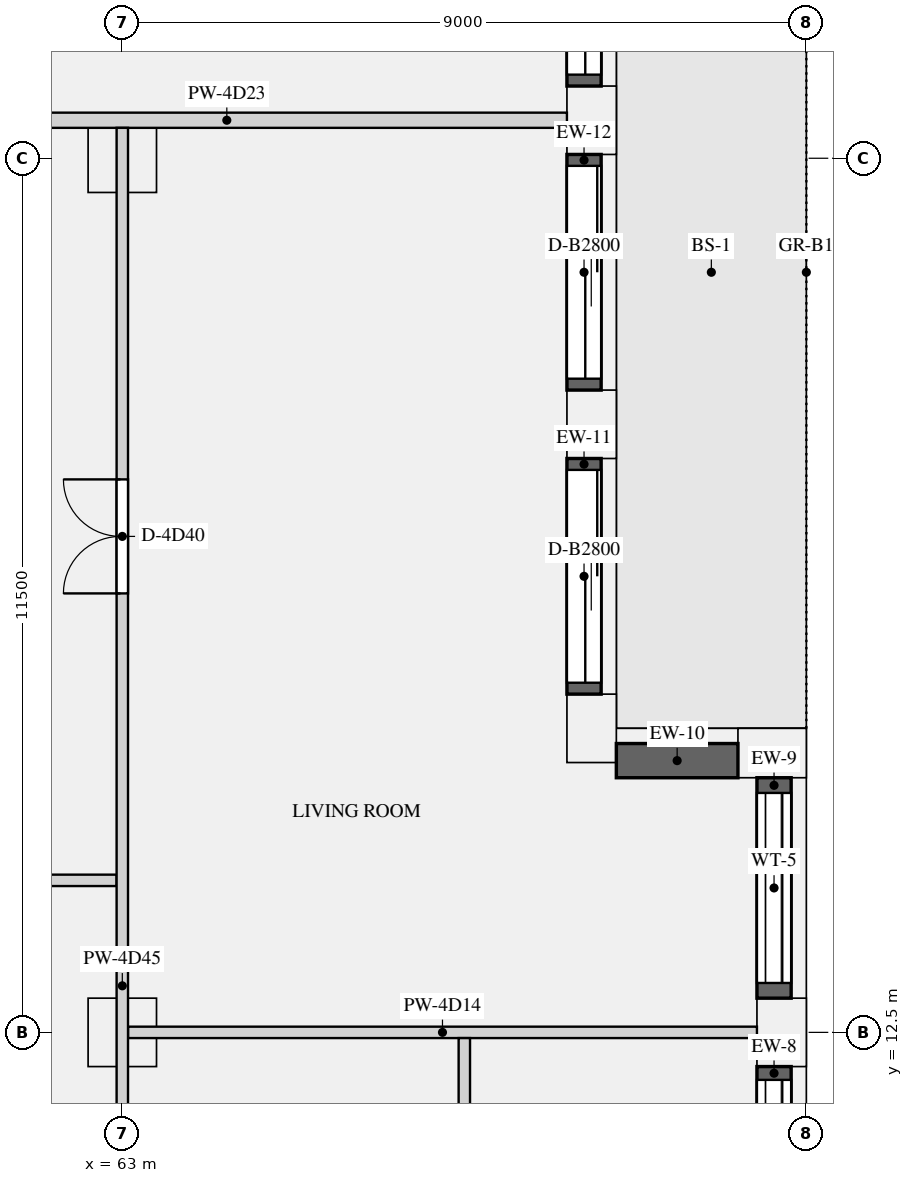
"""IFC4 building model, lengths in metres.
Left out: names, types, materials, properties, quantities, classifications, styles, units other than length and angle.
Written with IfcOpenShell. Run it as: python <this file> out.ifc"""

import sys

from ifc_helpers import new_model, si_unit, direction, frame, frame_2d, origin, origin_2d, place, context, subcontext, project, spatial, rectangle, extrude, element, fill, save


model = new_model("IFC4")
c1 = context("Model", 3, precision=1e-05, world=origin(), true_north=direction((0.0, 1.0)))
c2 = subcontext(c1, "Body", "Model", "MODEL_VIEW")
j1 = project(units=[si_unit("LENGTHUNIT", "METRE"), si_unit("PLANEANGLEUNIT", "RADIAN")], contexts=[c1])
p1 = place(None, origin())
s1 = spatial("IfcSite", under=j1, at=p1, CompositionType="ELEMENT")
p2 = place(p1, origin())
s2 = spatial("IfcBuilding", under=s1, at=p2, CompositionType="ELEMENT")
p3 = place(p2, frame((0.0, 0.0, 223.2)))
s3 = spatial("IfcBuildingStorey", under=s2, at=p3, CompositionType="ELEMENT", Elevation=223.2)
for number, where, z_axis, x_axis in (
    (1, (71.675, 12.5, 0.0), (0.0, 0.0, 1.0), (0.0, 1.0, 0.0)),
    (2, (71.55, 16.175, 0.0), (0.0, 0.0, 1.0), (-1.0, 0.0, 0.0)),
    (3, (69.175, 16.5, 0.0), (0.0, 0.0, 1.0), (0.0, 1.0, 0.0)),
    (4, (69.175, 20.5, 0.0), (0.0, 0.0, 1.0), (0.0, 1.0, 0.0)),
    (5, (69.175, 24.5, 0.0), (0.0, 0.0, 1.0), (0.0, 1.0, 0.0)),
):
    element("IfcColumn", number, at=place(p3, frame(where, z_axis=z_axis, x_axis=x_axis)), inside=s3, PredefinedType="USERDEFINED", context=c2, shape_type="SweptSolid", body=[
        extrude(rectangle(XDim=0.9, YDim=0.65, at=origin_2d()), origin(), (0.0, 0.0, 1.0), 3.15),
    ])
for number, where, z_axis, x_axis in (
    (6, (63.0, 24.0, 0.0), (0.0, 0.0, 1.0), (1.0, 0.0, 0.0)),
    (7, (63.0, 12.5, 0.0), (0.0, 0.0, 1.0), (1.0, 0.0, 0.0)),
):
    element("IfcColumn", number, at=place(p3, frame(where, z_axis=z_axis, x_axis=x_axis)), inside=s3, PredefinedType="COLUMN", context=c2, shape_type="SweptSolid", body=[
        extrude(rectangle(XDim=0.9, YDim=0.9, at=origin_2d()), origin(), (0.0, 0.0, 1.0), 3.15),
    ])
p4 = place(p3, frame((71.575, 8.95, 0.9), z_axis=(0.0, 0.0, 1.0), x_axis=(0.0, 1.0, 0.0)))
e8 = element("IfcWall", 8, at=p4, inside=s3, PredefinedType="SOLIDWALL", context=c2, shape_type="SweptSolid", body=[
    extrude(rectangle(XDim=3.1, YDim=0.45, at=frame_2d((1.55, 0.0))), origin(), (0.0, 0.0, 1.0), 1.93),
])
p5 = place(p4, frame((0.175, 0.0, 0.15)))
e9 = element("IfcOpeningElement", 9, at=p5, cuts=e8, PredefinedType="OPENING", context=c2, shape_type="SweptSolid", body=[
    extrude(rectangle(XDim=2.75, YDim=1.5, at=frame_2d((1.375, 0.75))), frame((0.0, 0.235, 0.0), z_axis=(0.0, -1.0, 0.0), x_axis=(1.0, 0.0, 0.0)), (0.0, 0.0, 1.0), 0.47),
])
p6 = place(p3, frame((71.575, 12.95, 0.9), z_axis=(0.0, 0.0, 1.0), x_axis=(0.0, 1.0, 0.0)))
e10 = element("IfcWall", 10, at=p6, inside=s3, PredefinedType="SOLIDWALL", context=c2, shape_type="SweptSolid", body=[
    extrude(rectangle(XDim=2.9, YDim=0.45, at=frame_2d((1.45, 0.0))), origin(), (0.0, 0.0, 1.0), 1.93),
])
p7 = place(p6, frame((0.2, 0.0, 0.15)))
e11 = element("IfcOpeningElement", 11, at=p7, cuts=e10, PredefinedType="OPENING", context=c2, shape_type="SweptSolid", body=[
    extrude(rectangle(XDim=2.5, YDim=1.5, at=frame_2d((1.25, 0.75))), frame((0.0, 0.235, 0.0), z_axis=(0.0, -1.0, 0.0), x_axis=(1.0, 0.0, 0.0)), (0.0, 0.0, 1.0), 0.47),
])
p8 = place(p3, frame((71.1, 16.075, 0.9), z_axis=(0.0, 0.0, 1.0), x_axis=(-1.0, 0.0, 0.0)))
e12 = element("IfcWall", 12, at=p8, inside=s3, PredefinedType="SOLIDWALL", context=c2, shape_type="SweptSolid", body=[
    extrude(rectangle(XDim=1.6, YDim=0.45, at=frame_2d((0.8, 0.0))), origin(), (0.0, 0.0, 1.0), 1.93),
])
p9 = place(p3, frame((69.075, 16.95, 0.0), z_axis=(0.0, 0.0, 1.0), x_axis=(0.0, 1.0, 0.0)))
e13 = element("IfcWall", 13, at=p9, inside=s3, PredefinedType="SOLIDWALL", context=c2, shape_type="SweptSolid", body=[
    extrude(rectangle(XDim=3.1, YDim=0.45, at=frame_2d((1.55, 0.0))), origin(), (0.0, 0.0, 1.0), 2.83),
])
p10 = place(p9, frame((0.15, 0.0, 0.0)))
e14 = element("IfcOpeningElement", 14, at=p10, cuts=e13, PredefinedType="OPENING", context=c2, shape_type="SweptSolid", body=[
    extrude(rectangle(XDim=2.8, YDim=2.3, at=frame_2d((1.4, 1.15))), frame((0.0, 0.235, 0.0), z_axis=(0.0, -1.0, 0.0), x_axis=(1.0, 0.0, 0.0)), (0.0, 0.0, 1.0), 0.47),
])
p11 = place(p3, frame((69.075, 20.95, 0.0), z_axis=(0.0, 0.0, 1.0), x_axis=(0.0, 1.0, 0.0)))
e15 = element("IfcWall", 15, at=p11, inside=s3, PredefinedType="SOLIDWALL", context=c2, shape_type="SweptSolid", body=[
    extrude(rectangle(XDim=3.1, YDim=0.45, at=frame_2d((1.55, 0.0))), origin(), (0.0, 0.0, 1.0), 2.83),
])
p12 = place(p11, frame((0.15, 0.0, 0.0)))
e16 = element("IfcOpeningElement", 16, at=p12, cuts=e15, PredefinedType="OPENING", context=c2, shape_type="SweptSolid", body=[
    extrude(rectangle(XDim=2.8, YDim=2.3, at=frame_2d((1.4, 1.15))), frame((0.0, 0.235, 0.0), z_axis=(0.0, -1.0, 0.0), x_axis=(1.0, 0.0, 0.0)), (0.0, 0.0, 1.0), 0.47),
])
p13 = place(p3, frame((69.075, 24.95, 0.0), z_axis=(0.0, 0.0, 1.0), x_axis=(0.0, 1.0, 0.0)))
e17 = element("IfcWall", 17, at=p13, inside=s3, PredefinedType="SOLIDWALL", context=c2, shape_type="SweptSolid", body=[
    extrude(rectangle(XDim=3.55, YDim=0.45, at=frame_2d((1.775, 0.0))), origin(), (0.0, 0.0, 1.0), 2.83),
])
p14 = place(p13, frame((0.15, 0.0, 0.0)))
e18 = element("IfcOpeningElement", 18, at=p14, cuts=e17, PredefinedType="OPENING", context=c2, shape_type="SweptSolid", body=[
    extrude(rectangle(XDim=3.25, YDim=2.3, at=frame_2d((1.625, 1.15))), frame((0.0, 0.235, 0.0), z_axis=(0.0, -1.0, 0.0), x_axis=(1.0, 0.0, 0.0)), (0.0, 0.0, 1.0), 0.47),
])
p15 = place(p3, frame((63.075, 12.5, 0.0), z_axis=(0.0, 0.0, 1.0), x_axis=(1.0, 0.0, 0.0)))
e19 = element("IfcWall", 19, at=p15, inside=s3, PredefinedType="PARTITIONING", context=c2, shape_type="SweptSolid", body=[
    extrude(rectangle(XDim=8.275, YDim=0.15, at=frame_2d((4.138, 0.0))), origin(), (0.0, 0.0, 1.0), 2.83),
])
p16 = place(p3, frame((59.9, 24.5, 0.0), z_axis=(0.0, 0.0, 1.0), x_axis=(1.0, 0.0, 0.0)))
e20 = element("IfcWall", 20, at=p16, inside=s3, PredefinedType="PARTITIONING", context=c2, shape_type="SweptSolid", body=[
    extrude(rectangle(XDim=8.95, YDim=0.2, at=frame_2d((4.475, 0.0))), origin(), (0.0, 0.0, 1.0), 2.83),
])
p17 = place(p3, frame((58.575, 14.5, 0.0), z_axis=(0.0, 0.0, 1.0), x_axis=(1.0, 0.0, 0.0)))
e21 = element("IfcWall", 21, at=p17, inside=s3, PredefinedType="PARTITIONING", context=c2, shape_type="SweptSolid", body=[
    extrude(rectangle(XDim=4.35, YDim=0.15, at=frame_2d((2.175, 0.0))), origin(), (0.0, 0.0, 1.0), 2.83),
])
p18 = place(p3, frame((63.0, 0.65, 0.0), z_axis=(0.0, 0.0, 1.0), x_axis=(0.0, 1.0, 0.0)))
e22 = element("IfcWall", 22, at=p18, inside=s3, PredefinedType="PARTITIONING", context=c2, shape_type="SweptSolid", body=[
    extrude(rectangle(XDim=23.75, YDim=0.15, at=frame_2d((11.875, 0.0))), origin(), (0.0, 0.0, 1.0), 2.83),
])
p19 = place(p18, frame((6.4, 0.0, 0.0)))
e23 = element("IfcOpeningElement", 23, at=p19, cuts=e22, PredefinedType="OPENING", context=c2, shape_type="SweptSolid", body=[
    extrude(rectangle(XDim=0.9, YDim=2.1, at=frame_2d((0.45, 1.05))), frame((0.0, 0.085, 0.0), z_axis=(0.0, -1.0, 0.0), x_axis=(1.0, 0.0, 0.0)), (0.0, 0.0, 1.0), 0.17),
])
p20 = place(p18, frame((17.625, 0.0, 0.0)))
e24 = element("IfcOpeningElement", 24, at=p20, cuts=e22, PredefinedType="OPENING", context=c2, shape_type="SweptSolid", body=[
    extrude(rectangle(XDim=1.5, YDim=2.1, at=frame_2d((0.75, 1.05))), frame((0.0, 0.085, 0.0), z_axis=(0.0, -1.0, 0.0), x_axis=(1.0, 0.0, 0.0)), (0.0, 0.0, 1.0), 0.17),
])
p21 = place(p3, frame((67.5, 8.575, 0.0), z_axis=(0.0, 0.0, 1.0), x_axis=(0.0, 1.0, 0.0)))
e25 = element("IfcWall", 25, at=p21, inside=s3, PredefinedType="PARTITIONING", context=c2, shape_type="SweptSolid", body=[
    extrude(rectangle(XDim=3.85, YDim=0.15, at=frame_2d((1.925, 0.0))), origin(), (0.0, 0.0, 1.0), 2.83),
])
p22 = place(p5, origin())
e26 = element("IfcWindow", 26, at=p22, inside=s3, PartitioningType="SINGLE_PANEL", PredefinedType="WINDOW", context=c2, shape_type="SweptSolid", body=[
    extrude(rectangle(XDim=2.75, YDim=1.5, at=frame_2d((1.375, 0.75))), frame((0.0, -0.065, 0.0), z_axis=(0.0, -1.0, 0.0), x_axis=(1.0, 0.0, 0.0)), (0.0, 0.0, 1.0), 0.06),
])
fill(e9, e26)
p23 = place(p7, origin())
e27 = element("IfcWindow", 27, at=p23, inside=s3, PartitioningType="SINGLE_PANEL", PredefinedType="WINDOW", context=c2, shape_type="SweptSolid", body=[
    extrude(rectangle(XDim=2.5, YDim=1.5, at=frame_2d((1.25, 0.75))), frame((0.0, -0.065, 0.0), z_axis=(0.0, -1.0, 0.0), x_axis=(1.0, 0.0, 0.0)), (0.0, 0.0, 1.0), 0.06),
])
fill(e11, e27)
p24 = place(p10, origin())
e28 = element("IfcDoor", 28, at=p24, inside=s3, OperationType="SLIDING_TO_LEFT", PredefinedType="DOOR", context=c2, shape_type="SweptSolid", body=[
    extrude(rectangle(XDim=2.8, YDim=2.3, at=frame_2d((1.4, 1.15))), frame((0.0, -0.07, 0.0), z_axis=(0.0, -1.0, 0.0), x_axis=(1.0, 0.0, 0.0)), (0.0, 0.0, 1.0), 0.05),
])
fill(e14, e28)
p25 = place(p12, origin())
e29 = element("IfcDoor", 29, at=p25, inside=s3, OperationType="SLIDING_TO_LEFT", PredefinedType="DOOR", context=c2, shape_type="SweptSolid", body=[
    extrude(rectangle(XDim=2.8, YDim=2.3, at=frame_2d((1.4, 1.15))), frame((0.0, -0.07, 0.0), z_axis=(0.0, -1.0, 0.0), x_axis=(1.0, 0.0, 0.0)), (0.0, 0.0, 1.0), 0.05),
])
fill(e16, e29)
p26 = place(p14, origin())
e30 = element("IfcDoor", 30, at=p26, inside=s3, OperationType="SLIDING_TO_LEFT", PredefinedType="DOOR", context=c2, shape_type="SweptSolid", body=[
    extrude(rectangle(XDim=3.25, YDim=2.3, at=frame_2d((1.625, 1.15))), frame((0.0, -0.07, 0.0), z_axis=(0.0, -1.0, 0.0), x_axis=(1.0, 0.0, 0.0)), (0.0, 0.0, 1.0), 0.05),
])
fill(e18, e30)
p27 = place(p20, origin())
e31 = element("IfcDoor", 31, at=p27, inside=s3, OperationType="DOUBLE_DOOR_SINGLE_SWING", PredefinedType="DOOR", context=c2, shape_type="SweptSolid", body=[
    extrude(rectangle(XDim=1.5, YDim=2.1, at=frame_2d((0.75, 1.05))), frame((0.0, 0.025, 0.0), z_axis=(0.0, -1.0, 0.0), x_axis=(1.0, 0.0, 0.0)), (0.0, 0.0, 1.0), 0.05),
])
fill(e24, e31)
save(model, sys.argv[1])
